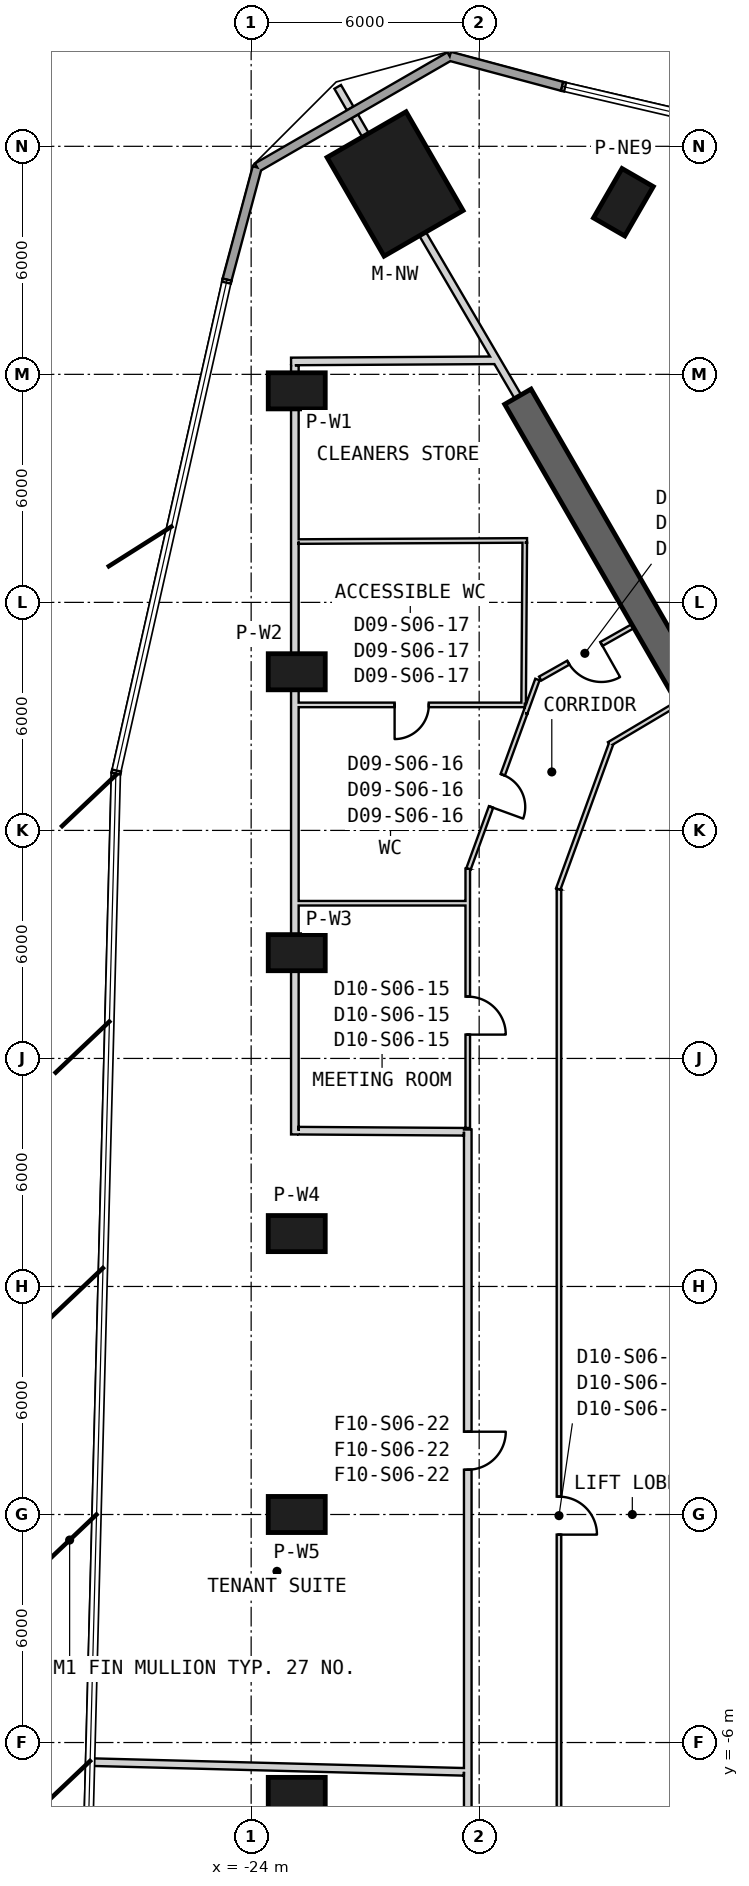
"""IFC4 building model, lengths in metres.
Left out: names, types, materials, properties, quantities, classifications, styles, units other than length and angle.
Written with IfcOpenShell. Run it as: python <this file> out.ifc"""

import sys

from ifc_helpers import new_model, si_unit, direction, frame, frame_2d, origin, origin_2d, place, context, subcontext, project, spatial, rectangle, extrude, element, fill, save


model = new_model("IFC4")
c1 = context("Model", 3, precision=1e-05, world=origin(), true_north=direction((0.0, 1.0)))
c2 = subcontext(c1, "Body", "Model", "MODEL_VIEW")
j1 = project(units=[si_unit("LENGTHUNIT", "METRE"), si_unit("PLANEANGLEUNIT", "RADIAN")], contexts=[c1])
p1 = place(None, origin())
s1 = spatial("IfcSite", under=j1, at=p1, CompositionType="ELEMENT")
p2 = place(p1, origin())
s2 = spatial("IfcBuilding", under=s1, at=p2, CompositionType="ELEMENT")
p3 = place(p2, frame((0.0, 0.0, 119.3)))
s3 = spatial("IfcBuildingStorey", under=s2, at=p3, CompositionType="ELEMENT", Elevation=119.3)
p4 = place(p3, frame((-20.213, 35.01, 0.0), z_axis=(0.0, 0.0, 1.0), x_axis=(-0.5, 0.866025403784, 0.0)))
e1 = element("IfcColumn", 1, at=p4, inside=s3, PredefinedType="COLUMN", context=c2, shape_type="SweptSolid", body=[
    extrude(rectangle(XDim=3.0, YDim=2.4, at=origin_2d()), origin(), (0.0, 0.0, 1.0), 4.1),
])
for number, where, z_axis, x_axis in (
    (2, (-22.8, 29.566, 0.0), (0.0, 0.0, 1.0), (-1.0, 0.0, 0.0)),
    (3, (-22.8, 22.174, 0.0), (0.0, 0.0, 1.0), (-1.0, 0.0, 0.0)),
    (4, (-22.8, 14.783, 0.0), (0.0, 0.0, 1.0), (-1.0, 0.0, 0.0)),
    (5, (-22.8, 7.391, 0.0), (0.0, 0.0, 1.0), (-1.0, 0.0, 0.0)),
    (6, (-22.8, 0.0, 0.0), (0.0, 0.0, 1.0), (-1.0, 0.0, 0.0)),
    (7, (-22.8, -7.391, 0.0), (0.0, 0.0, 1.0), (-1.0, 0.0, 0.0)),
    (8, (-14.205, 34.528, 0.0), (0.0, 0.0, 1.0), (0.5, 0.866, 0.0)),
):
    element("IfcColumn", number, at=place(p3, frame(where, z_axis=z_axis, x_axis=x_axis)), inside=s3, PredefinedType="COLUMN", context=c2, shape_type="SweptSolid", body=[
        extrude(rectangle(XDim=1.5, YDim=0.95, at=origin_2d()), origin(), (0.0, 0.0, 1.0), 4.1),
    ])
p5 = place(p3, frame((-10.575, 18.316, 0.0), z_axis=(0.0, 0.0, 1.0), x_axis=(-0.500008359956, 0.866020577108, 0.0)))
e9 = element("IfcWall", 9, at=p5, inside=s3, PredefinedType="SHEAR", context=c2, shape_type="SweptSolid", body=[
    extrude(rectangle(XDim=12.812, YDim=0.8, at=frame_2d((6.406, 0.0))), origin(), (0.0, 0.0, 1.0), 4.1),
])
p6 = place(p5, frame((1.9, 0.0, 0.0)))
e10 = element("IfcOpeningElement", 10, at=p6, cuts=e9, PredefinedType="OPENING", context=c2, shape_type="SweptSolid", body=[
    extrude(rectangle(XDim=1.4, YDim=2.4, at=frame_2d((0.7, 1.2))), frame((0.0, 0.41, 0.0), z_axis=(0.0, -1.0, 0.0), x_axis=(1.0, 0.0, 0.0)), (0.0, 0.0, 1.0), 0.82),
])
p7 = place(p3, frame((-15.817, 37.578, 0.0), z_axis=(0.0, 0.0, 1.0), x_axis=(-0.965920651814, 0.258838355735, 0.0)))
e11 = element("IfcWall", 11, at=p7, inside=s3, PredefinedType="SOLIDWALL", context=c2, shape_type="SweptSolid", body=[
    extrude(rectangle(XDim=3.063, YDim=0.24, at=frame_2d((1.531, 0.0))), origin(), (0.0, 0.0, 1.0), 3.8),
])
p8 = place(p3, frame((-18.775, 38.37, 0.0), z_axis=(0.0, 0.0, 1.0), x_axis=(-0.866031321059, -0.49998975084, 0.0)))
e12 = element("IfcWall", 12, at=p8, inside=s3, PredefinedType="SOLIDWALL", context=c2, shape_type="SweptSolid", body=[
    extrude(rectangle(XDim=5.851, YDim=0.24, at=frame_2d((2.925, 0.0))), origin(), (0.0, 0.0, 1.0), 3.8),
])
p9 = place(p3, frame((-23.842, 35.445, 0.0), z_axis=(0.0, 0.0, 1.0), x_axis=(-0.258805249011, -0.965929522835, 0.0)))
e13 = element("IfcWall", 13, at=p9, inside=s3, PredefinedType="SOLIDWALL", context=c2, shape_type="SweptSolid", body=[
    extrude(rectangle(XDim=3.058, YDim=0.24, at=frame_2d((1.529, 0.0))), origin(), (0.0, 0.0, 1.0), 3.8),
])
p10 = place(p3, frame((-12.782, 21.339, 0.0), z_axis=(0.0, 0.0, 1.0), x_axis=(-0.859769901207, -0.510681619973, 0.0)))
e14 = element("IfcWall", 14, at=p10, inside=s3, PredefinedType="PARTITIONING", context=c2, shape_type="SweptSolid", body=[
    extrude(rectangle(XDim=2.093, YDim=0.12, at=frame_2d((1.046, 0.0))), origin(), (0.0, 0.0, 1.0), 3.8),
])
p11 = place(p3, frame((-14.528, 20.282, 0.0), z_axis=(0.0, 0.0, 1.0), x_axis=(-0.341969257767, -0.939711140054, 0.0)))
e15 = element("IfcWall", 15, at=p11, inside=s3, PredefinedType="PARTITIONING", context=c2, shape_type="SweptSolid", body=[
    extrude(rectangle(XDim=4.073, YDim=0.12, at=frame_2d((2.037, 0.0))), origin(), (0.0, 0.0, 1.0), 2.88),
])
p12 = place(p3, frame((-15.9, 16.451, 0.0), z_axis=(0.0, 0.0, 1.0), x_axis=(0.0, -1.0, 0.0)))
e16 = element("IfcWall", 16, at=p12, inside=s3, PredefinedType="PARTITIONING", context=c2, shape_type="SweptSolid", body=[
    extrude(rectangle(XDim=33.022, YDim=0.12, at=frame_2d((16.511, 0.0))), origin(), (0.0, 0.0, 1.0), 2.98),
])
p13 = place(p12, frame((15.981, 0.0, 0.0)))
e17 = element("IfcOpeningElement", 17, at=p13, cuts=e16, PredefinedType="OPENING", context=c2, shape_type="SweptSolid", body=[
    extrude(rectangle(XDim=1.0, YDim=2.1, at=frame_2d((0.5, 1.05))), frame((0.0, 0.07, 0.0), z_axis=(0.0, -1.0, 0.0), x_axis=(1.0, 0.0, 0.0)), (0.0, 0.0, 1.0), 0.14),
])
p14 = place(p3, frame((-18.3, 10.13, 0.0), z_axis=(0.0, 0.0, 1.0), x_axis=(0.0, -1.0, 0.0)))
e18 = element("IfcWall", 18, at=p14, inside=s3, PredefinedType="PARTITIONING", context=c2, shape_type="SweptSolid", body=[
    extrude(rectangle(XDim=26.964, YDim=0.2, at=frame_2d((13.482, 0.0))), origin(), (0.0, 0.0, 1.0), 3.08),
])
p15 = place(p14, frame((21.434, 0.0, 0.0)))
e19 = element("IfcOpeningElement", 19, at=p15, cuts=e18, PredefinedType="OPENING", context=c2, shape_type="SweptSolid", body=[
    extrude(rectangle(XDim=1.0, YDim=2.1, at=frame_2d((0.5, 1.05))), frame((0.0, 0.11, 0.0), z_axis=(0.0, -1.0, 0.0), x_axis=(1.0, 0.0, 0.0)), (0.0, 0.0, 1.0), 0.22),
])
p16 = place(p14, frame((7.952, 0.0, 0.0)))
e20 = element("IfcOpeningElement", 20, at=p16, cuts=e18, PredefinedType="OPENING", context=c2, shape_type="SweptSolid", body=[
    extrude(rectangle(XDim=1.0, YDim=2.1, at=frame_2d((0.5, 1.05))), frame((0.0, 0.11, 0.0), z_axis=(0.0, -1.0, 0.0), x_axis=(1.0, 0.0, 0.0)), (0.0, 0.0, 1.0), 0.22),
])
p17 = place(p3, frame((-18.3, 16.994, 0.0), z_axis=(0.0, 0.0, 1.0), x_axis=(0.0, -1.0, 0.0)))
e21 = element("IfcWall", 21, at=p17, inside=s3, PredefinedType="PARTITIONING", context=c2, shape_type="SweptSolid", body=[
    extrude(rectangle(XDim=0.91, YDim=0.12, at=frame_2d((0.455, 0.0))), origin(), (0.0, 0.0, 1.0), 3.8),
])
p18 = place(p3, frame((-18.3, 16.084, 0.0), z_axis=(0.0, 0.0, 1.0), x_axis=(0.0, -1.0, 0.0)))
e22 = element("IfcWall", 22, at=p18, inside=s3, PredefinedType="PARTITIONING", context=c2, shape_type="SweptSolid", body=[
    extrude(rectangle(XDim=5.914, YDim=0.12, at=frame_2d((2.957, 0.0))), origin(), (0.0, 0.0, 1.0), 3.08),
])
p19 = place(p18, frame((2.457, 0.0, 0.0)))
e23 = element("IfcOpeningElement", 23, at=p19, cuts=e22, PredefinedType="OPENING", context=c2, shape_type="SweptSolid", body=[
    extrude(rectangle(XDim=1.0, YDim=2.1, at=frame_2d((0.5, 1.05))), frame((0.0, 0.07, 0.0), z_axis=(0.0, -1.0, 0.0), x_axis=(1.0, 0.0, 0.0)), (0.0, 0.0, 1.0), 0.14),
])
p20 = place(p3, frame((-16.467, 21.97, 0.0), z_axis=(0.0, 0.0, 1.0), x_axis=(-0.341973086836, -0.939709746613, 0.0)))
e24 = element("IfcWall", 24, at=p20, inside=s3, PredefinedType="PARTITIONING", context=c2, shape_type="SweptSolid", body=[
    extrude(rectangle(XDim=0.937, YDim=0.12, at=frame_2d((0.469, 0.0))), origin(), (0.0, 0.0, 1.0), 2.88),
])
p21 = place(p3, frame((-16.788, 21.09, 0.0), z_axis=(0.0, 0.0, 1.0), x_axis=(-0.342035154905, -0.939687156882, 0.0)))
e25 = element("IfcWall", 25, at=p21, inside=s3, PredefinedType="PARTITIONING", context=c2, shape_type="SweptSolid", body=[
    extrude(rectangle(XDim=4.362, YDim=0.12, at=frame_2d((2.181, 0.0))), origin(), (0.0, 0.0, 1.0), 2.98),
])
p22 = place(p21, frame((1.731, 0.0, 0.0)))
e26 = element("IfcOpeningElement", 26, at=p22, cuts=e25, PredefinedType="OPENING", context=c2, shape_type="SweptSolid", body=[
    extrude(rectangle(XDim=0.9, YDim=2.1, at=frame_2d((0.45, 1.05))), frame((0.0, 0.07, 0.0), z_axis=(0.0, -1.0, 0.0), x_axis=(1.0, 0.0, 0.0)), (0.0, 0.0, 1.0), 0.14),
])
p23 = place(p3, frame((-13.956, 23.373, 0.0), z_axis=(0.0, 0.0, 1.0), x_axis=(-0.870551471841, -0.492077366757, 0.0)))
e27 = element("IfcWall", 27, at=p23, inside=s3, PredefinedType="PARTITIONING", context=c2, shape_type="SweptSolid", body=[
    extrude(rectangle(XDim=2.8, YDim=0.12, at=frame_2d((1.4, 0.0))), origin(), (0.0, 0.0, 1.0), 3.8),
])
p24 = place(p23, frame((0.95, 0.0, 0.0)))
e28 = element("IfcOpeningElement", 28, at=p24, cuts=e27, PredefinedType="OPENING", context=c2, shape_type="SweptSolid", body=[
    extrude(rectangle(XDim=1.0, YDim=2.1, at=frame_2d((0.5, 1.05))), frame((0.0, 0.07, 0.0), z_axis=(0.0, -1.0, 0.0), x_axis=(1.0, 0.0, 0.0)), (0.0, 0.0, 1.0), 0.14),
])
p25 = place(p3, frame((-18.4, -6.771, 0.0), z_axis=(0.0, 0.0, 1.0), x_axis=(-0.999660021388, 0.026073772986, 0.0)))
e29 = element("IfcWall", 29, at=p25, inside=s3, PredefinedType="PARTITIONING", context=c2, shape_type="SweptSolid", body=[
    extrude(rectangle(XDim=9.841, YDim=0.2, at=frame_2d((4.92, 0.0))), origin(), (0.0, 0.0, 1.0), 3.08),
])
p26 = place(p3, frame((-21.723, 37.565, 0.0), z_axis=(0.0, 0.0, 1.0), x_axis=(0.499862072928, -0.866105021373, 0.0)))
e30 = element("IfcWall", 30, at=p26, inside=s3, PredefinedType="PARTITIONING", context=c2, shape_type="SweptSolid", body=[
    extrude(rectangle(XDim=0.656, YDim=0.2, at=frame_2d((0.328, 0.0))), origin(), (0.0, 0.0, 1.0), 3.8),
])
p27 = place(p3, frame((-21.275, 36.789, 0.0), z_axis=(0.0, 0.0, 1.0), x_axis=(0.499857944771, -0.866107403877, 0.0)))
e31 = element("IfcWall", 31, at=p27, inside=s3, PredefinedType="PARTITIONING", context=c2, shape_type="SweptSolid", body=[
    extrude(rectangle(XDim=0.572, YDim=0.2, at=frame_2d((0.286, 0.0))), origin(), (0.0, 0.0, 1.0), 3.8),
])
p28 = place(p3, frame((-19.489, 33.696, 0.0), z_axis=(0.0, 0.0, 1.0), x_axis=(0.50520690072, -0.862998254613, 0.0)))
e32 = element("IfcWall", 32, at=p28, inside=s3, PredefinedType="PARTITIONING", context=c2, shape_type="SweptSolid", body=[
    extrude(rectangle(XDim=4.963, YDim=0.2, at=frame_2d((2.482, 0.0))), origin(), (0.0, 0.0, 1.0), 3.37),
])
p29 = place(p3, frame((-22.85, 10.0, 0.0), z_axis=(0.0, 0.0, 1.0), x_axis=(0.0, 1.0, 0.0)))
e33 = element("IfcWall", 33, at=p29, inside=s3, PredefinedType="PARTITIONING", context=c2, shape_type="SweptSolid", body=[
    extrude(rectangle(XDim=6.084, YDim=0.2, at=frame_2d((3.042, 0.0))), origin(), (0.0, 0.0, 1.0), 3.8),
])
p30 = place(p3, frame((-22.85, 21.302, 0.0), z_axis=(0.0, 0.0, 1.0), x_axis=(0.0, 1.0, 0.0)))
e34 = element("IfcWall", 34, at=p30, inside=s3, PredefinedType="PARTITIONING", context=c2, shape_type="SweptSolid", body=[
    extrude(rectangle(XDim=4.297, YDim=0.2, at=frame_2d((2.149, 0.0))), origin(), (0.0, 0.0, 1.0), 3.8),
])
p31 = place(p3, frame((-22.85, 25.6, 0.0), z_axis=(0.0, 0.0, 1.0), x_axis=(0.0, 1.0, 0.0)))
e35 = element("IfcWall", 35, at=p31, inside=s3, PredefinedType="PARTITIONING", context=c2, shape_type="SweptSolid", body=[
    extrude(rectangle(XDim=4.64, YDim=0.2, at=frame_2d((2.32, 0.0))), origin(), (0.0, 0.0, 1.0), 3.8),
])
p32 = place(p3, frame((-22.75, 10.099, 0.0), z_axis=(0.0, 0.0, 1.0), x_axis=(0.999978071859, -0.006622371337, 0.0)))
e36 = element("IfcWall", 36, at=p32, inside=s3, PredefinedType="PARTITIONING", context=c2, shape_type="SweptSolid", body=[
    extrude(rectangle(XDim=4.35, YDim=0.2, at=frame_2d((2.175, 0.0))), origin(), (0.0, 0.0, 1.0), 3.8),
])
p33 = place(p3, frame((-22.85, 16.084, 0.0), z_axis=(0.0, 0.0, 1.0), x_axis=(0.0, 1.0, 0.0)))
e37 = element("IfcWall", 37, at=p33, inside=s3, PredefinedType="PARTITIONING", context=c2, shape_type="SweptSolid", body=[
    extrude(rectangle(XDim=5.219, YDim=0.2, at=frame_2d((2.609, 0.0))), origin(), (0.0, 0.0, 1.0), 3.8),
])
p34 = place(p3, frame((-17.534, 30.37, 0.0), z_axis=(0.0, 0.0, 1.0), x_axis=(-0.999983869047, -0.00567993362, 0.0)))
e38 = element("IfcWall", 38, at=p34, inside=s3, PredefinedType="PARTITIONING", context=c2, shape_type="SweptSolid", body=[
    extrude(rectangle(XDim=5.416, YDim=0.2, at=frame_2d((2.708, 0.0))), origin(), (0.0, 0.0, 1.0), 3.37),
])
p35 = place(p3, frame((-18.36, 16.084, 0.0), z_axis=(0.0, 0.0, 1.0), x_axis=(-1.0, 0.0, 0.0)))
e39 = element("IfcWall", 39, at=p35, inside=s3, PredefinedType="PARTITIONING", context=c2, shape_type="SweptSolid", body=[
    extrude(rectangle(XDim=4.39, YDim=0.12, at=frame_2d((2.195, 0.0))), origin(), (0.0, 0.0, 1.0), 3.8),
])
p36 = place(p3, frame((-16.8, 21.302, 0.0), z_axis=(0.0, 0.0, 1.0), x_axis=(-1.0, 0.0, 0.0)))
e40 = element("IfcWall", 40, at=p36, inside=s3, PredefinedType="PARTITIONING", context=c2, shape_type="SweptSolid", body=[
    extrude(rectangle(XDim=5.95, YDim=0.12, at=frame_2d((2.975, 0.0))), origin(), (0.0, 0.0, 1.0), 2.98),
])
p37 = place(p36, frame((2.525, 0.0, 0.0)))
e41 = element("IfcOpeningElement", 41, at=p37, cuts=e40, PredefinedType="OPENING", context=c2, shape_type="SweptSolid", body=[
    extrude(rectangle(XDim=0.9, YDim=2.1, at=frame_2d((0.45, 1.05))), frame((0.0, 0.07, 0.0), z_axis=(0.0, -1.0, 0.0), x_axis=(1.0, 0.0, 0.0)), (0.0, 0.0, 1.0), 0.14),
])
p38 = place(p3, frame((-22.75, 25.6, 0.0), z_axis=(0.0, 0.0, 1.0), x_axis=(0.999987719631, 0.004955863907, 0.0)))
e42 = element("IfcWall", 42, at=p38, inside=s3, PredefinedType="PARTITIONING", context=c2, shape_type="SweptSolid", body=[
    extrude(rectangle(XDim=6.01, YDim=0.12, at=frame_2d((3.005, 0.0))), origin(), (0.0, 0.0, 1.0), 2.88),
])
p39 = place(p3, frame((-16.83, 21.332, 0.0), z_axis=(0.0, 0.0, 1.0), x_axis=(0.006971081403, 0.999975701717, 0.0)))
e43 = element("IfcWall", 43, at=p39, inside=s3, PredefinedType="PARTITIONING", context=c2, shape_type="SweptSolid", body=[
    extrude(rectangle(XDim=4.238, YDim=0.12, at=frame_2d((2.119, 0.0))), origin(), (0.0, 0.0, 1.0), 2.88),
])
p40 = place(p13, origin())
e44 = element("IfcDoor", 44, at=p40, inside=s3, OperationType="SINGLE_SWING_RIGHT", PredefinedType="NOTDEFINED", context=c2, shape_type="SweptSolid", body=[
    extrude(rectangle(XDim=1.0, YDim=2.1, at=frame_2d((0.5, 1.05))), frame((0.0, 0.025, 0.0), z_axis=(0.0, -1.0, 0.0), x_axis=(1.0, 0.0, 0.0)), (0.0, 0.0, 1.0), 0.05),
])
fill(e17, e44)
p41 = place(p19, origin())
e45 = element("IfcDoor", 45, at=p41, inside=s3, OperationType="SINGLE_SWING_LEFT", PredefinedType="NOTDEFINED", context=c2, shape_type="SweptSolid", body=[
    extrude(rectangle(XDim=1.0, YDim=2.1, at=frame_2d((0.5, 1.05))), frame((0.0, 0.025, 0.0), z_axis=(0.0, -1.0, 0.0), x_axis=(1.0, 0.0, 0.0)), (0.0, 0.0, 1.0), 0.05),
])
fill(e23, e45)
p42 = place(p22, origin())
e46 = element("IfcDoor", 46, at=p42, inside=s3, OperationType="SINGLE_SWING_LEFT", PredefinedType="NOTDEFINED", context=c2, shape_type="SweptSolid", body=[
    extrude(rectangle(XDim=0.9, YDim=2.1, at=frame_2d((0.45, 1.05))), frame((0.0, 0.025, 0.0), z_axis=(0.0, -1.0, 0.0), x_axis=(1.0, 0.0, 0.0)), (0.0, 0.0, 1.0), 0.05),
])
fill(e26, e46)
p43 = place(p37, origin())
e47 = element("IfcDoor", 47, at=p43, inside=s3, OperationType="SINGLE_SWING_LEFT", PredefinedType="NOTDEFINED", context=c2, shape_type="SweptSolid", body=[
    extrude(rectangle(XDim=0.9, YDim=2.1, at=frame_2d((0.45, 1.05))), frame((0.0, 0.025, 0.0), z_axis=(0.0, -1.0, 0.0), x_axis=(1.0, 0.0, 0.0)), (0.0, 0.0, 1.0), 0.05),
])
fill(e41, e47)
p44 = place(p24, origin())
e48 = element("IfcDoor", 48, at=p44, inside=s3, OperationType="SINGLE_SWING_RIGHT", PredefinedType="NOTDEFINED", context=c2, shape_type="SweptSolid", body=[
    extrude(rectangle(XDim=1.0, YDim=2.1, at=frame_2d((0.5, 1.05))), frame((0.0, 0.025, 0.0), z_axis=(0.0, -1.0, 0.0), x_axis=(1.0, 0.0, 0.0)), (0.0, 0.0, 1.0), 0.05),
])
fill(e28, e48)
p45 = place(p16, origin())
e49 = element("IfcDoor", 49, at=p45, inside=s3, OperationType="SINGLE_SWING_LEFT", PredefinedType="USERDEFINED", context=c2, shape_type="SweptSolid", body=[
    extrude(rectangle(XDim=1.0, YDim=2.1, at=frame_2d((0.5, 1.05))), frame((0.0, 0.025, 0.0), z_axis=(0.0, -1.0, 0.0), x_axis=(1.0, 0.0, 0.0)), (0.0, 0.0, 1.0), 0.05),
])
fill(e20, e49)
save(model, sys.argv[1])
